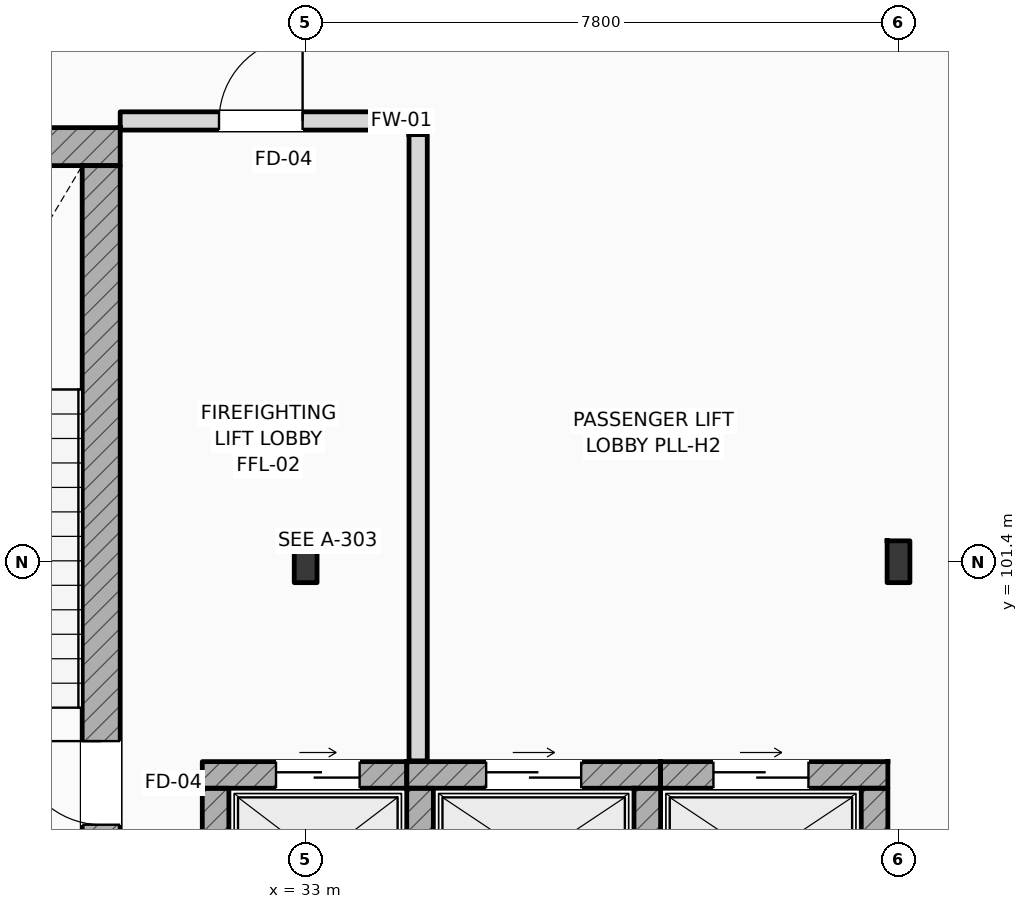
"""IFC4 building model, lengths in metres.
Left out: names, types, materials, properties, quantities, classifications, styles, units other than length and angle.
Written with IfcOpenShell. Run it as: python <this file> out.ifc"""

import sys

from ifc_helpers import new_model, si_unit, direction, frame, frame_2d, origin, origin_2d, place, context, subcontext, project, spatial, rectangle, i_section, extrude, element, fill, save


model = new_model("IFC4")
c1 = context("Model", 3, precision=1e-05, world=origin(), true_north=direction((0.0, 1.0)))
c2 = subcontext(c1, "Body", "Model", "MODEL_VIEW")
j1 = project(units=[si_unit("LENGTHUNIT", "METRE"), si_unit("PLANEANGLEUNIT", "RADIAN")], contexts=[c1])
p1 = place(None, origin())
s1 = spatial("IfcSite", under=j1, at=p1, CompositionType="ELEMENT")
p2 = place(p1, origin())
s2 = spatial("IfcBuilding", under=s1, at=p2, CompositionType="ELEMENT")
p3 = place(p2, frame((0.0, 0.0, 11.4)))
s3 = spatial("IfcBuildingStorey", under=s2, at=p3, CompositionType="ELEMENT", Elevation=11.4)
for number, where, z_axis, x_axis in (
    (1, (33.0, 101.4, 0.0), (0.0, 0.0, 1.0), (1.0, 0.0, 0.0)),
    (2, (40.8, 101.4, 0.0), (0.0, 0.0, 1.0), (1.0, 0.0, 0.0)),
):
    element("IfcColumn", number, at=place(p3, frame(where, z_axis=z_axis, x_axis=x_axis)), inside=s3, PredefinedType="COLUMN", context=c2, shape_type="SweptSolid", body=[
        extrude(i_section(OverallWidth=0.3, OverallDepth=0.55, WebThickness=0.015, FlangeThickness=0.029, FilletRadius=0.027, at=origin_2d()), origin(), (0.0, 0.0, 1.0), 4.8),
    ])
p4 = place(p3, frame((25.4, 106.862, 0.0), z_axis=(0.0, 0.0, 1.0), x_axis=(1.0, 0.0, 0.0)))
e3 = element("IfcWall", 3, at=p4, inside=s3, PredefinedType="SHEAR", context=c2, shape_type="SweptSolid", body=[
    extrude(rectangle(XDim=5.16, YDim=0.5, at=frame_2d((2.58, 0.0))), origin(), (0.0, 0.0, 1.0), 4.8),
])
p5 = place(p3, frame((30.31, 97.5, 0.0), z_axis=(0.0, 0.0, 1.0), x_axis=(0.0, 1.0, 0.0)))
e4 = element("IfcWall", 4, at=p5, inside=s3, PredefinedType="SHEAR", context=c2, shape_type="SweptSolid", body=[
    extrude(rectangle(XDim=9.112, YDim=0.5, at=frame_2d((4.556, 0.0))), origin(), (0.0, 0.0, 1.0), 4.8),
])
p6 = place(p5, frame((0.44, 0.0, 0.0)))
e5 = element("IfcOpeningElement", 5, at=p6, cuts=e4, PredefinedType="OPENING", context=c2, shape_type="SweptSolid", body=[
    extrude(rectangle(XDim=1.1, YDim=2.2, at=frame_2d((0.55, 1.1))), frame((0.0, 0.26, 0.0), z_axis=(0.0, -1.0, 0.0), x_axis=(1.0, 0.0, 0.0)), (0.0, 0.0, 1.0), 0.52),
])
p7 = place(p3, frame((31.64, 98.595, 0.0), z_axis=(0.0, 0.0, 1.0), x_axis=(1.0, 0.0, 0.0)))
e6 = element("IfcWall", 6, at=p7, inside=s3, PredefinedType="SHEAR", context=c2, shape_type="SweptSolid", body=[
    extrude(rectangle(XDim=2.69, YDim=0.35, at=frame_2d((1.345, 0.0))), origin(), (0.0, 0.0, 1.0), 4.52),
])
p8 = place(p7, frame((0.97, 0.0, 0.0)))
e7 = element("IfcOpeningElement", 7, at=p8, cuts=e6, PredefinedType="OPENING", context=c2, shape_type="SweptSolid", body=[
    extrude(rectangle(XDim=1.1, YDim=2.2, at=frame_2d((0.55, 1.1))), frame((0.0, 0.185, 0.0), z_axis=(0.0, -1.0, 0.0), x_axis=(1.0, 0.0, 0.0)), (0.0, 0.0, 1.0), 0.37),
])
p9 = place(p3, frame((31.815, 96.58, 0.0), z_axis=(0.0, 0.0, 1.0), x_axis=(0.0, 1.0, 0.0)))
e8 = element("IfcWall", 8, at=p9, inside=s3, PredefinedType="SHEAR", context=c2, shape_type="SweptSolid", body=[
    extrude(rectangle(XDim=1.84, YDim=0.35, at=frame_2d((0.92, 0.0))), origin(), (0.0, 0.0, 1.0), 4.52),
])
p10 = place(p3, frame((34.33, 98.595, 0.0), z_axis=(0.0, 0.0, 1.0), x_axis=(1.0, 0.0, 0.0)))
e9 = element("IfcWall", 9, at=p10, inside=s3, PredefinedType="SHEAR", context=c2, shape_type="SweptSolid", body=[
    extrude(rectangle(XDim=3.34, YDim=0.35, at=frame_2d((1.67, 0.0))), origin(), (0.0, 0.0, 1.0), 4.52),
])
p11 = place(p10, frame((1.045, 0.0, 0.0)))
e10 = element("IfcOpeningElement", 10, at=p11, cuts=e9, PredefinedType="OPENING", context=c2, shape_type="SweptSolid", body=[
    extrude(rectangle(XDim=1.25, YDim=2.25, at=frame_2d((0.625, 1.125))), frame((0.0, 0.185, 0.0), z_axis=(0.0, -1.0, 0.0), x_axis=(1.0, 0.0, 0.0)), (0.0, 0.0, 1.0), 0.37),
])
for number, where, z_axis, x_axis in (
    (11, (34.505, 96.58, 0.0), (0.0, 0.0, 1.0), (0.0, 1.0, 0.0)),
    (12, (37.495, 96.58, 0.0), (0.0, 0.0, 1.0), (0.0, 1.0, 0.0)),
):
    element("IfcWall", number, at=place(p3, frame(where, z_axis=z_axis, x_axis=x_axis)), inside=s3, PredefinedType="SHEAR", context=c2, shape_type="SweptSolid", body=[
        extrude(rectangle(XDim=1.84, YDim=0.35, at=frame_2d((0.92, 0.0))), origin(), (0.0, 0.0, 1.0), 4.52),
    ])
p12 = place(p3, frame((37.67, 98.595, 0.0), z_axis=(0.0, 0.0, 1.0), x_axis=(1.0, 0.0, 0.0)))
e13 = element("IfcWall", 13, at=p12, inside=s3, PredefinedType="SHEAR", context=c2, shape_type="SweptSolid", body=[
    extrude(rectangle(XDim=2.99, YDim=0.35, at=frame_2d((1.495, 0.0))), origin(), (0.0, 0.0, 1.0), 4.52),
])
p13 = place(p12, frame((0.695, 0.0, 0.0)))
e14 = element("IfcOpeningElement", 14, at=p13, cuts=e13, PredefinedType="OPENING", context=c2, shape_type="SweptSolid", body=[
    extrude(rectangle(XDim=1.25, YDim=2.25, at=frame_2d((0.625, 1.125))), frame((0.0, 0.185, 0.0), z_axis=(0.0, -1.0, 0.0), x_axis=(1.0, 0.0, 0.0)), (0.0, 0.0, 1.0), 0.37),
])
p14 = place(p3, frame((40.485, 96.58, 0.0), z_axis=(0.0, 0.0, 1.0), x_axis=(0.0, 1.0, 0.0)))
e15 = element("IfcWall", 15, at=p14, inside=s3, PredefinedType="SHEAR", context=c2, shape_type="SweptSolid", body=[
    extrude(rectangle(XDim=1.84, YDim=0.35, at=frame_2d((0.92, 0.0))), origin(), (0.0, 0.0, 1.0), 4.11),
])
p15 = place(p3, frame((34.48, 98.78, 0.0), z_axis=(0.0, 0.0, 1.0), x_axis=(0.0, 1.0, 0.0)))
e16 = element("IfcWall", 16, at=p15, inside=s3, PredefinedType="STANDARD", context=c2, shape_type="SweptSolid", body=[
    extrude(rectangle(XDim=8.24, YDim=0.24, at=frame_2d((4.12, 0.0))), origin(), (0.0, 0.0, 1.0), 4.52),
])
p16 = place(p3, frame((30.56, 107.2, 0.0), z_axis=(0.0, 0.0, 1.0), x_axis=(1.0, 0.0, 0.0)))
e17 = element("IfcWall", 17, at=p16, inside=s3, PredefinedType="STANDARD", context=c2, shape_type="SweptSolid", body=[
    extrude(rectangle(XDim=4.1, YDim=0.24, at=frame_2d((2.05, 0.0))), origin(), (0.0, 0.0, 1.0), 4.52),
])
p17 = place(p16, frame((1.3, 0.0, 0.0)))
e18 = element("IfcOpeningElement", 18, at=p17, cuts=e17, PredefinedType="OPENING", context=c2, shape_type="SweptSolid", body=[
    extrude(rectangle(XDim=1.1, YDim=2.2, at=frame_2d((0.55, 1.1))), frame((0.0, 0.13, 0.0), z_axis=(0.0, -1.0, 0.0), x_axis=(1.0, 0.0, 0.0)), (0.0, 0.0, 1.0), 0.26),
])
p18 = place(p6, origin())
e19 = element("IfcDoor", 19, at=p18, inside=s3, OperationType="SINGLE_SWING_RIGHT", PredefinedType="DOOR", context=c2, shape_type="SweptSolid", body=[
    extrude(rectangle(XDim=1.1, YDim=2.2, at=frame_2d((0.55, 1.1))), frame((0.0, 0.025, 0.0), z_axis=(0.0, -1.0, 0.0), x_axis=(1.0, 0.0, 0.0)), (0.0, 0.0, 1.0), 0.05),
])
fill(e5, e19)
p19 = place(p8, origin())
e20 = element("IfcDoor", 20, at=p19, inside=s3, OperationType="SLIDING_TO_LEFT", PredefinedType="DOOR", context=c2, shape_type="SweptSolid", body=[
    extrude(rectangle(XDim=1.1, YDim=2.2, at=frame_2d((0.55, 1.1))), frame((0.0, 0.025, 0.0), z_axis=(0.0, -1.0, 0.0), x_axis=(1.0, 0.0, 0.0)), (0.0, 0.0, 1.0), 0.05),
])
fill(e7, e20)
p20 = place(p11, origin())
e21 = element("IfcDoor", 21, at=p20, inside=s3, OperationType="SLIDING_TO_LEFT", PredefinedType="DOOR", context=c2, shape_type="SweptSolid", body=[
    extrude(rectangle(XDim=1.25, YDim=2.25, at=frame_2d((0.625, 1.125))), frame((0.0, 0.025, 0.0), z_axis=(0.0, -1.0, 0.0), x_axis=(1.0, 0.0, 0.0)), (0.0, 0.0, 1.0), 0.05),
])
fill(e10, e21)
p21 = place(p13, origin())
e22 = element("IfcDoor", 22, at=p21, inside=s3, OperationType="SLIDING_TO_LEFT", PredefinedType="DOOR", context=c2, shape_type="SweptSolid", body=[
    extrude(rectangle(XDim=1.25, YDim=2.25, at=frame_2d((0.625, 1.125))), frame((0.0, 0.025, 0.0), z_axis=(0.0, -1.0, 0.0), x_axis=(1.0, 0.0, 0.0)), (0.0, 0.0, 1.0), 0.05),
])
fill(e14, e22)
p22 = place(p17, origin())
e23 = element("IfcDoor", 23, at=p22, inside=s3, OperationType="SINGLE_SWING_RIGHT", PredefinedType="DOOR", context=c2, shape_type="SweptSolid", body=[
    extrude(rectangle(XDim=1.1, YDim=2.2, at=frame_2d((0.55, 1.1))), frame((0.0, 0.025, 0.0), z_axis=(0.0, -1.0, 0.0), x_axis=(1.0, 0.0, 0.0)), (0.0, 0.0, 1.0), 0.05),
])
fill(e18, e23)
save(model, sys.argv[1])
